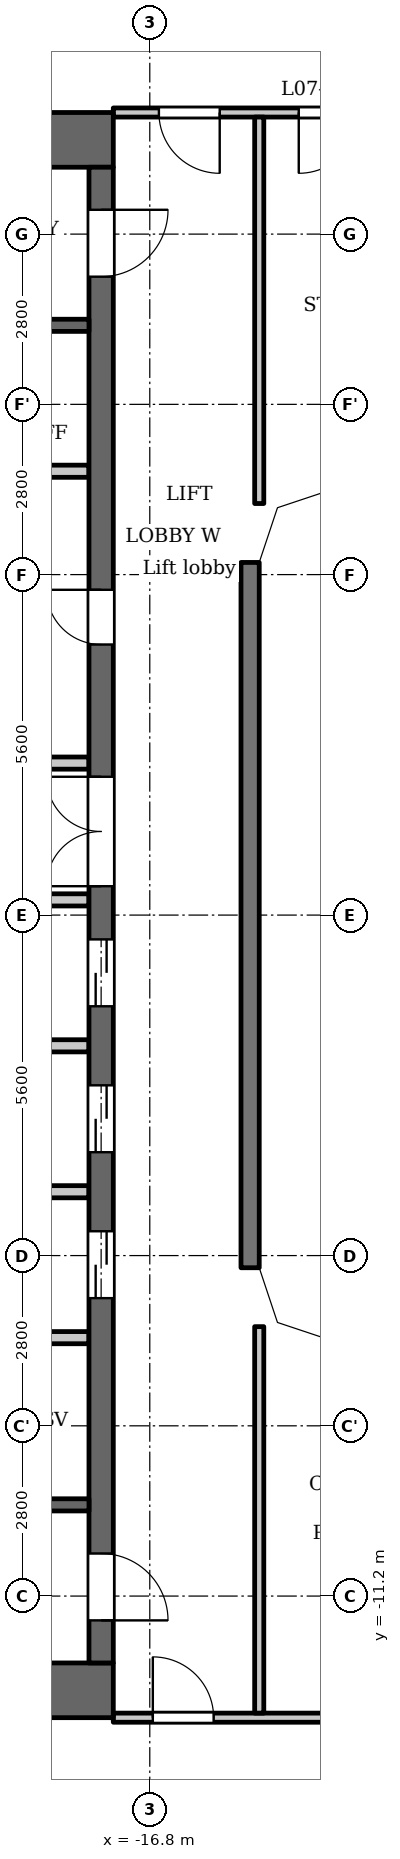
"""IFC4 building model, lengths in metres.
Left out: names, types, materials, properties, quantities, classifications, styles, units other than length and angle.
Written with IfcOpenShell. Run it as: python <this file> out.ifc"""

import sys

from ifc_helpers import new_model, si_unit, direction, frame, frame_2d, origin, place, context, subcontext, project, spatial, polyline, rectangle, outline, extrude, element, fill, save


model = new_model("IFC4")
c1 = context("Model", 3, precision=1e-05, world=origin(), true_north=direction((0.0, 1.0)))
c2 = subcontext(c1, "Body", "Model", "MODEL_VIEW")
j1 = project(units=[si_unit("LENGTHUNIT", "METRE"), si_unit("PLANEANGLEUNIT", "RADIAN")], contexts=[c1])
p1 = place(None, origin())
s1 = spatial("IfcSite", under=j1, at=p1, CompositionType="ELEMENT")
p2 = place(p1, origin())
s2 = spatial("IfcBuilding", under=s1, at=p2, CompositionType="ELEMENT")
p3 = place(p2, frame((0.0, 0.0, 34.0)))
s3 = spatial("IfcBuildingStorey", under=s2, at=p3, CompositionType="ELEMENT", Elevation=34.0)
p4 = place(p3, frame((-15.15, -5.8, 0.0), z_axis=(0.0, 0.0, 1.0), x_axis=(0.0, 1.0, 0.0)))
e1 = element("IfcWall", 1, at=p4, inside=s3, PredefinedType="SOLIDWALL", context=c2, shape_type="SweptSolid", body=[
    extrude(rectangle(XDim=11.6, YDim=0.3, at=frame_2d((5.8, 0.0))), origin(), (0.0, 0.0, 1.0), 3.2),
])
for number, where, z_axis, x_axis in (
    (2, (-17.4, 12.75, 0.0), (0.0, 0.0, 1.0), (-1.0, 0.0, 0.0)),
    (3, (-17.4, -12.75, 0.0), (0.0, 0.0, 1.0), (-1.0, 0.0, 0.0)),
):
    element("IfcWall", number, at=place(p3, frame(where, z_axis=z_axis, x_axis=x_axis)), inside=s3, PredefinedType="SHEAR", context=c2, shape_type="SweptSolid", body=[
        extrude(rectangle(XDim=10.4, YDim=0.9, at=frame_2d((5.2, 0.0))), origin(), (0.0, 0.0, 1.0), 3.2),
    ])
p5 = place(p3, frame((-17.6, -12.3, 0.0), z_axis=(0.0, 0.0, 1.0), x_axis=(0.0, 1.0, 0.0)))
e4 = element("IfcWall", 4, at=p5, inside=s3, PredefinedType="SHEAR", context=c2, shape_type="SweptSolid", body=[
    extrude(rectangle(XDim=24.6, YDim=0.4, at=frame_2d((12.3, 0.0))), origin(), (0.0, 0.0, 1.0), 3.2),
])
p6 = place(p5, frame((6.0, 0.0, 0.0)))
e5 = element("IfcOpeningElement", 5, at=p6, cuts=e4, PredefinedType="OPENING", context=c2, shape_type="SweptSolid", body=[
    extrude(rectangle(XDim=1.1, YDim=2.1, at=frame_2d((0.55, 1.05))), frame((0.0, 0.21, 0.0), z_axis=(0.0, -1.0, 0.0), x_axis=(1.0, 0.0, 0.0)), (0.0, 0.0, 1.0), 0.42),
])
p7 = place(p5, frame((8.4, 0.0, 0.0)))
e6 = element("IfcOpeningElement", 6, at=p7, cuts=e4, PredefinedType="OPENING", context=c2, shape_type="SweptSolid", body=[
    extrude(rectangle(XDim=1.1, YDim=2.1, at=frame_2d((0.55, 1.05))), frame((0.0, 0.21, 0.0), z_axis=(0.0, -1.0, 0.0), x_axis=(1.0, 0.0, 0.0)), (0.0, 0.0, 1.0), 0.42),
])
p8 = place(p5, frame((10.8, 0.0, 0.0)))
e7 = element("IfcOpeningElement", 7, at=p8, cuts=e4, PredefinedType="OPENING", context=c2, shape_type="SweptSolid", body=[
    extrude(rectangle(XDim=1.1, YDim=2.1, at=frame_2d((0.55, 1.05))), frame((0.0, 0.21, 0.0), z_axis=(0.0, -1.0, 0.0), x_axis=(1.0, 0.0, 0.0)), (0.0, 0.0, 1.0), 0.42),
])
p9 = place(p5, frame((16.75, 0.0, 0.0)))
e8 = element("IfcOpeningElement", 8, at=p9, cuts=e4, PredefinedType="OPENING", context=c2, shape_type="SweptSolid", body=[
    extrude(rectangle(XDim=0.9, YDim=2.1, at=frame_2d((0.45, 1.05))), frame((0.0, 0.21, 0.0), z_axis=(0.0, -1.0, 0.0), x_axis=(1.0, 0.0, 0.0)), (0.0, 0.0, 1.0), 0.42),
])
p10 = place(p5, frame((22.8, 0.0, 0.0)))
e9 = element("IfcOpeningElement", 9, at=p10, cuts=e4, PredefinedType="OPENING", context=c2, shape_type="SweptSolid", body=[
    extrude(rectangle(XDim=1.1, YDim=2.1, at=frame_2d((0.55, 1.05))), frame((0.0, 0.21, 0.0), z_axis=(0.0, -1.0, 0.0), x_axis=(1.0, 0.0, 0.0)), (0.0, 0.0, 1.0), 0.42),
])
p11 = place(p5, frame((0.7, 0.0, 0.0)))
e10 = element("IfcOpeningElement", 10, at=p11, cuts=e4, PredefinedType="OPENING", context=c2, shape_type="SweptSolid", body=[
    extrude(rectangle(XDim=1.1, YDim=2.1, at=frame_2d((0.55, 1.05))), frame((0.0, 0.21, 0.0), z_axis=(0.0, -1.0, 0.0), x_axis=(1.0, 0.0, 0.0)), (0.0, 0.0, 1.0), 0.42),
])
p12 = place(p5, frame((12.775, 0.0, 0.0)))
e11 = element("IfcOpeningElement", 11, at=p12, cuts=e4, PredefinedType="OPENING", context=c2, shape_type="SweptSolid", body=[
    extrude(rectangle(XDim=1.8, YDim=2.1, at=frame_2d((0.9, 1.05))), frame((0.0, 0.21, 0.0), z_axis=(0.0, -1.0, 0.0), x_axis=(1.0, 0.0, 0.0)), (0.0, 0.0, 1.0), 0.42),
])
p13 = place(p3, frame((-17.8, -9.7, 0.0), z_axis=(0.0, 0.0, 1.0), x_axis=(-1.0, 0.0, 0.0)))
e12 = element("IfcWall", 12, at=p13, inside=s3, PredefinedType="SHEAR", context=c2, shape_type="SweptSolid", body=[
    extrude(rectangle(XDim=8.3, YDim=0.2, at=frame_2d((4.15, 0.0))), origin(), (0.0, 0.0, 1.0), 3.2),
])
p14 = place(p13, frame((0.85, 0.0, 0.0)))
e13 = element("IfcOpeningElement", 13, at=p14, cuts=e12, PredefinedType="OPENING", context=c2, shape_type="SweptSolid", body=[
    extrude(rectangle(XDim=1.1, YDim=2.1, at=frame_2d((0.55, 1.05))), frame((0.0, 0.11, 0.0), z_axis=(0.0, -1.0, 0.0), x_axis=(1.0, 0.0, 0.0)), (0.0, 0.0, 1.0), 0.22),
])
p15 = place(p13, frame((3.75, 0.0, 0.0)))
e14 = element("IfcOpeningElement", 14, at=p15, cuts=e12, PredefinedType="OPENING", context=c2, shape_type="SweptSolid", body=[
    extrude(rectangle(XDim=1.1, YDim=2.1, at=frame_2d((0.55, 1.05))), frame((0.0, 0.11, 0.0), z_axis=(0.0, -1.0, 0.0), x_axis=(1.0, 0.0, 0.0)), (0.0, 0.0, 1.0), 0.22),
])
for number, where, z_axis, x_axis in (
    (15, (-17.8, -6.95, 0.0), (0.0, 0.0, 1.0), (-1.0, 0.0, 0.0)),
    (16, (-17.8, -4.55, 0.0), (0.0, 0.0, 1.0), (-1.0, 0.0, 0.0)),
    (17, (-17.8, -2.15, 0.0), (0.0, 0.0, 1.0), (-1.0, 0.0, 0.0)),
):
    element("IfcWall", number, at=place(p3, frame(where, z_axis=z_axis, x_axis=x_axis)), inside=s3, PredefinedType="PARTITIONING", context=c2, shape_type="SweptSolid", body=[
        extrude(rectangle(XDim=2.8, YDim=0.2, at=frame_2d((1.4, 0.0))), origin(), (0.0, 0.0, 1.0), 3.2),
    ])
for number, where, z_axis, x_axis in (
    (18, (-17.8, 0.25, 0.0), (0.0, 0.0, 1.0), (-1.0, 0.0, 0.0)),
    (19, (-17.8, 2.5, 0.0), (0.0, 0.0, 1.0), (-1.0, 0.0, 0.0)),
):
    element("IfcWall", number, at=place(p3, frame(where, z_axis=z_axis, x_axis=x_axis)), inside=s3, PredefinedType="PARTITIONING", context=c2, shape_type="SweptSolid", body=[
        extrude(rectangle(XDim=3.0, YDim=0.2, at=frame_2d((1.5, 0.0))), origin(), (0.0, 0.0, 1.0), 3.2),
    ])
p16 = place(p3, frame((-17.8, 7.3, 0.0), z_axis=(0.0, 0.0, 1.0), x_axis=(-1.0, 0.0, 0.0)))
e20 = element("IfcWall", 20, at=p16, inside=s3, PredefinedType="PARTITIONING", context=c2, shape_type="SweptSolid", body=[
    extrude(rectangle(XDim=2.8, YDim=0.2, at=frame_2d((1.4, 0.0))), origin(), (0.0, 0.0, 1.0), 3.2),
])
p17 = place(p3, frame((-17.8, 9.7, 0.0), z_axis=(0.0, 0.0, 1.0), x_axis=(-1.0, 0.0, 0.0)))
e21 = element("IfcWall", 21, at=p17, inside=s3, PredefinedType="SHEAR", context=c2, shape_type="SweptSolid", body=[
    extrude(rectangle(XDim=8.3, YDim=0.2, at=frame_2d((4.15, 0.0))), origin(), (0.0, 0.0, 1.0), 3.2),
])
p18 = place(p17, frame((0.85, 0.0, 0.0)))
e22 = element("IfcOpeningElement", 22, at=p18, cuts=e21, PredefinedType="OPENING", context=c2, shape_type="SweptSolid", body=[
    extrude(rectangle(XDim=1.1, YDim=2.1, at=frame_2d((0.55, 1.05))), frame((0.0, 0.11, 0.0), z_axis=(0.0, -1.0, 0.0), x_axis=(1.0, 0.0, 0.0)), (0.0, 0.0, 1.0), 0.22),
])
p19 = place(p17, frame((3.75, 0.0, 0.0)))
e23 = element("IfcOpeningElement", 23, at=p19, cuts=e21, PredefinedType="OPENING", context=c2, shape_type="SweptSolid", body=[
    extrude(rectangle(XDim=1.1, YDim=2.1, at=frame_2d((0.55, 1.05))), frame((0.0, 0.11, 0.0), z_axis=(0.0, -1.0, 0.0), x_axis=(1.0, 0.0, 0.0)), (0.0, 0.0, 1.0), 0.22),
])
p20 = place(p3, frame((-17.4, -13.2, 0.0), z_axis=(0.0, 0.0, 1.0), x_axis=(1.0, 0.0, 0.0)))
e24 = element("IfcWall", 24, at=p20, inside=s3, PredefinedType="PARTITIONING", context=c2, shape_type="SweptSolid", body=[
    extrude(rectangle(XDim=34.8, YDim=0.15, at=frame_2d((17.4, 0.0))), origin(), (0.0, 0.0, 1.0), 3.2),
])
p21 = place(p20, frame((0.65, 0.0, 0.0)))
e25 = element("IfcOpeningElement", 25, at=p21, cuts=e24, PredefinedType="OPENING", context=c2, shape_type="SweptSolid", body=[
    extrude(rectangle(XDim=1.0, YDim=2.1, at=frame_2d((0.5, 1.05))), frame((0.0, 0.085, 0.0), z_axis=(0.0, -1.0, 0.0), x_axis=(1.0, 0.0, 0.0)), (0.0, 0.0, 1.0), 0.17),
])
p22 = place(p20, frame((33.05, 0.0, 0.0)))
e26 = element("IfcOpeningElement", 26, at=p22, cuts=e24, PredefinedType="OPENING", context=c2, shape_type="SweptSolid", body=[
    extrude(rectangle(XDim=1.0, YDim=2.1, at=frame_2d((0.5, 1.05))), frame((0.0, 0.085, 0.0), z_axis=(0.0, -1.0, 0.0), x_axis=(1.0, 0.0, 0.0)), (0.0, 0.0, 1.0), 0.17),
])
p23 = place(p20, frame((4.55, 0.0, 0.0)))
e27 = element("IfcOpeningElement", 27, at=p23, cuts=e24, PredefinedType="OPENING", context=c2, shape_type="SweptSolid", body=[
    extrude(rectangle(XDim=1.0, YDim=2.1, at=frame_2d((0.5, 1.05))), frame((0.0, 0.085, 0.0), z_axis=(0.0, -1.0, 0.0), x_axis=(1.0, 0.0, 0.0)), (0.0, 0.0, 1.0), 0.17),
])
p24 = place(p20, frame((6.9, 0.0, 0.0)))
e28 = element("IfcOpeningElement", 28, at=p24, cuts=e24, PredefinedType="OPENING", context=c2, shape_type="SweptSolid", body=[
    extrude(rectangle(XDim=1.0, YDim=2.1, at=frame_2d((0.5, 1.05))), frame((0.0, 0.085, 0.0), z_axis=(0.0, -1.0, 0.0), x_axis=(1.0, 0.0, 0.0)), (0.0, 0.0, 1.0), 0.17),
])
p25 = place(p20, frame((15.75, 0.0, 0.0)))
e29 = element("IfcOpeningElement", 29, at=p25, cuts=e24, PredefinedType="OPENING", context=c2, shape_type="SweptSolid", body=[
    extrude(rectangle(XDim=1.0, YDim=2.1, at=frame_2d((0.5, 1.05))), frame((0.0, 0.085, 0.0), z_axis=(0.0, -1.0, 0.0), x_axis=(1.0, 0.0, 0.0)), (0.0, 0.0, 1.0), 0.17),
])
p26 = place(p20, frame((18.1, 0.0, 0.0)))
e30 = element("IfcOpeningElement", 30, at=p26, cuts=e24, PredefinedType="OPENING", context=c2, shape_type="SweptSolid", body=[
    extrude(rectangle(XDim=1.0, YDim=2.1, at=frame_2d((0.5, 1.05))), frame((0.0, 0.085, 0.0), z_axis=(0.0, -1.0, 0.0), x_axis=(1.0, 0.0, 0.0)), (0.0, 0.0, 1.0), 0.17),
])
p27 = place(p20, frame((26.95, 0.0, 0.0)))
e31 = element("IfcOpeningElement", 31, at=p27, cuts=e24, PredefinedType="OPENING", context=c2, shape_type="SweptSolid", body=[
    extrude(rectangle(XDim=1.0, YDim=2.1, at=frame_2d((0.5, 1.05))), frame((0.0, 0.085, 0.0), z_axis=(0.0, -1.0, 0.0), x_axis=(1.0, 0.0, 0.0)), (0.0, 0.0, 1.0), 0.17),
])
p28 = place(p20, frame((29.25, 0.0, 0.0)))
e32 = element("IfcOpeningElement", 32, at=p28, cuts=e24, PredefinedType="OPENING", context=c2, shape_type="SweptSolid", body=[
    extrude(rectangle(XDim=1.0, YDim=2.1, at=frame_2d((0.5, 1.05))), frame((0.0, 0.085, 0.0), z_axis=(0.0, -1.0, 0.0), x_axis=(1.0, 0.0, 0.0)), (0.0, 0.0, 1.0), 0.17),
])
p29 = place(p3, frame((-17.4, 13.2, 0.0), z_axis=(0.0, 0.0, 1.0), x_axis=(1.0, 0.0, 0.0)))
e33 = element("IfcWall", 33, at=p29, inside=s3, PredefinedType="PARTITIONING", context=c2, shape_type="SweptSolid", body=[
    extrude(rectangle(XDim=34.8, YDim=0.15, at=frame_2d((17.4, 0.0))), origin(), (0.0, 0.0, 1.0), 3.2),
])
p30 = place(p29, frame((0.75, 0.0, 0.0)))
e34 = element("IfcOpeningElement", 34, at=p30, cuts=e33, PredefinedType="OPENING", context=c2, shape_type="SweptSolid", body=[
    extrude(rectangle(XDim=1.0, YDim=2.1, at=frame_2d((0.5, 1.05))), frame((0.0, 0.085, 0.0), z_axis=(0.0, -1.0, 0.0), x_axis=(1.0, 0.0, 0.0)), (0.0, 0.0, 1.0), 0.17),
])
p31 = place(p29, frame((33.15, 0.0, 0.0)))
e35 = element("IfcOpeningElement", 35, at=p31, cuts=e33, PredefinedType="OPENING", context=c2, shape_type="SweptSolid", body=[
    extrude(rectangle(XDim=1.0, YDim=2.1, at=frame_2d((0.5, 1.05))), frame((0.0, 0.085, 0.0), z_axis=(0.0, -1.0, 0.0), x_axis=(1.0, 0.0, 0.0)), (0.0, 0.0, 1.0), 0.17),
])
p32 = place(p29, frame((3.05, 0.0, 0.0)))
e36 = element("IfcOpeningElement", 36, at=p32, cuts=e33, PredefinedType="OPENING", context=c2, shape_type="SweptSolid", body=[
    extrude(rectangle(XDim=1.0, YDim=2.1, at=frame_2d((0.5, 1.05))), frame((0.0, 0.085, 0.0), z_axis=(0.0, -1.0, 0.0), x_axis=(1.0, 0.0, 0.0)), (0.0, 0.0, 1.0), 0.17),
])
p33 = place(p29, frame((10.1, 0.0, 0.0)))
e37 = element("IfcOpeningElement", 37, at=p33, cuts=e33, PredefinedType="OPENING", context=c2, shape_type="SweptSolid", body=[
    extrude(rectangle(XDim=1.0, YDim=2.1, at=frame_2d((0.5, 1.05))), frame((0.0, 0.085, 0.0), z_axis=(0.0, -1.0, 0.0), x_axis=(1.0, 0.0, 0.0)), (0.0, 0.0, 1.0), 0.17),
])
p34 = place(p29, frame((12.45, 0.0, 0.0)))
e38 = element("IfcOpeningElement", 38, at=p34, cuts=e33, PredefinedType="OPENING", context=c2, shape_type="SweptSolid", body=[
    extrude(rectangle(XDim=1.0, YDim=2.1, at=frame_2d((0.5, 1.05))), frame((0.0, 0.085, 0.0), z_axis=(0.0, -1.0, 0.0), x_axis=(1.0, 0.0, 0.0)), (0.0, 0.0, 1.0), 0.17),
])
p35 = place(p29, frame((21.3, 0.0, 0.0)))
e39 = element("IfcOpeningElement", 39, at=p35, cuts=e33, PredefinedType="OPENING", context=c2, shape_type="SweptSolid", body=[
    extrude(rectangle(XDim=1.0, YDim=2.1, at=frame_2d((0.5, 1.05))), frame((0.0, 0.085, 0.0), z_axis=(0.0, -1.0, 0.0), x_axis=(1.0, 0.0, 0.0)), (0.0, 0.0, 1.0), 0.17),
])
p36 = place(p29, frame((23.65, 0.0, 0.0)))
e40 = element("IfcOpeningElement", 40, at=p36, cuts=e33, PredefinedType="OPENING", context=c2, shape_type="SweptSolid", body=[
    extrude(rectangle(XDim=1.0, YDim=2.1, at=frame_2d((0.5, 1.05))), frame((0.0, 0.085, 0.0), z_axis=(0.0, -1.0, 0.0), x_axis=(1.0, 0.0, 0.0)), (0.0, 0.0, 1.0), 0.17),
])
p37 = place(p29, frame((30.75, 0.0, 0.0)))
e41 = element("IfcOpeningElement", 41, at=p37, cuts=e33, PredefinedType="OPENING", context=c2, shape_type="SweptSolid", body=[
    extrude(rectangle(XDim=1.0, YDim=2.1, at=frame_2d((0.5, 1.05))), frame((0.0, 0.085, 0.0), z_axis=(0.0, -1.0, 0.0), x_axis=(1.0, 0.0, 0.0)), (0.0, 0.0, 1.0), 0.17),
])
for number, where, z_axis, x_axis in (
    (42, (-15.0, -13.125, 0.0), (0.0, 0.0, 1.0), (0.0, 1.0, 0.0)),
    (43, (-15.0, 6.769, 0.0), (0.0, 0.0, 1.0), (0.0, 1.0, 0.0)),
):
    element("IfcWall", number, at=place(p3, frame(where, z_axis=z_axis, x_axis=x_axis)), inside=s3, PredefinedType="PARTITIONING", context=c2, shape_type="SweptSolid", body=[
        extrude(rectangle(XDim=6.356, YDim=0.15, at=frame_2d((3.178, 0.0))), origin(), (0.0, 0.0, 1.0), 3.2),
    ])
p38 = place(p3, origin())
e44 = element("IfcWall", 44, at=p38, inside=s3, PredefinedType="SOLIDWALL", context=c2, shape_type="SweptSolid", body=[
    extrude(outline(polyline([(-13.849, 7.3), (-14.937, 6.937), (-15.3, 5.849), (-15.3, 5.8), (-15.0, 5.8), (-14.7, 6.7), (-13.8, 7.0), (-13.8, 7.3), (-13.849, 7.3)])), origin(), (0.0, 0.0, 1.0), 3.2),
])
e45 = element("IfcWall", 45, at=p38, inside=s3, PredefinedType="SOLIDWALL", context=c2, shape_type="SweptSolid", body=[
    extrude(outline(polyline([(-14.937, -6.937), (-13.849, -7.3), (-13.8, -7.3), (-13.8, -7.0), (-14.7, -6.7), (-15.0, -5.8), (-15.3, -5.8), (-15.3, -5.849), (-14.937, -6.937)])), origin(), (0.0, 0.0, 1.0), 3.2),
])
p39 = place(p6, origin())
e46 = element("IfcDoor", 46, at=p39, inside=s3, OperationType="DOUBLE_DOOR_SLIDING", PredefinedType="DOOR", context=c2, shape_type="SweptSolid", body=[
    extrude(rectangle(XDim=1.1, YDim=2.1, at=frame_2d((0.55, 1.05))), frame((0.0, 0.025, 0.0), z_axis=(0.0, -1.0, 0.0), x_axis=(1.0, 0.0, 0.0)), (0.0, 0.0, 1.0), 0.05),
])
fill(e5, e46)
p40 = place(p7, origin())
e47 = element("IfcDoor", 47, at=p40, inside=s3, OperationType="DOUBLE_DOOR_SLIDING", PredefinedType="DOOR", context=c2, shape_type="SweptSolid", body=[
    extrude(rectangle(XDim=1.1, YDim=2.1, at=frame_2d((0.55, 1.05))), frame((0.0, 0.025, 0.0), z_axis=(0.0, -1.0, 0.0), x_axis=(1.0, 0.0, 0.0)), (0.0, 0.0, 1.0), 0.05),
])
fill(e6, e47)
p41 = place(p8, origin())
e48 = element("IfcDoor", 48, at=p41, inside=s3, OperationType="DOUBLE_DOOR_SLIDING", PredefinedType="DOOR", context=c2, shape_type="SweptSolid", body=[
    extrude(rectangle(XDim=1.1, YDim=2.1, at=frame_2d((0.55, 1.05))), frame((0.0, 0.025, 0.0), z_axis=(0.0, -1.0, 0.0), x_axis=(1.0, 0.0, 0.0)), (0.0, 0.0, 1.0), 0.05),
])
fill(e7, e48)
p42 = place(p9, origin())
e49 = element("IfcDoor", 49, at=p42, inside=s3, OperationType="SINGLE_SWING_LEFT", PredefinedType="DOOR", context=c2, shape_type="SweptSolid", body=[
    extrude(rectangle(XDim=0.9, YDim=2.1, at=frame_2d((0.45, 1.05))), frame((0.0, 0.025, 0.0), z_axis=(0.0, -1.0, 0.0), x_axis=(1.0, 0.0, 0.0)), (0.0, 0.0, 1.0), 0.05),
])
fill(e8, e49)
p43 = place(p10, origin())
e50 = element("IfcDoor", 50, at=p43, inside=s3, OperationType="SINGLE_SWING_RIGHT", PredefinedType="DOOR", context=c2, shape_type="SweptSolid", body=[
    extrude(rectangle(XDim=1.1, YDim=2.1, at=frame_2d((0.55, 1.05))), frame((0.0, 0.025, 0.0), z_axis=(0.0, -1.0, 0.0), x_axis=(1.0, 0.0, 0.0)), (0.0, 0.0, 1.0), 0.05),
])
fill(e9, e50)
p44 = place(p11, origin())
e51 = element("IfcDoor", 51, at=p44, inside=s3, OperationType="SINGLE_SWING_LEFT", PredefinedType="DOOR", context=c2, shape_type="SweptSolid", body=[
    extrude(rectangle(XDim=1.1, YDim=2.1, at=frame_2d((0.55, 1.05))), frame((0.0, 0.025, 0.0), z_axis=(0.0, -1.0, 0.0), x_axis=(1.0, 0.0, 0.0)), (0.0, 0.0, 1.0), 0.05),
])
fill(e10, e51)
p45 = place(p12, origin())
e52 = element("IfcDoor", 52, at=p45, inside=s3, OperationType="DOUBLE_DOOR_SINGLE_SWING", PredefinedType="DOOR", context=c2, shape_type="SweptSolid", body=[
    extrude(rectangle(XDim=1.8, YDim=2.1, at=frame_2d((0.9, 1.05))), frame((0.0, 0.025, 0.0), z_axis=(0.0, -1.0, 0.0), x_axis=(1.0, 0.0, 0.0)), (0.0, 0.0, 1.0), 0.05),
])
fill(e11, e52)
p46 = place(p30, origin())
e53 = element("IfcDoor", 53, at=p46, inside=s3, OperationType="SINGLE_SWING_RIGHT", PredefinedType="DOOR", context=c2, shape_type="SweptSolid", body=[
    extrude(rectangle(XDim=1.0, YDim=2.1, at=frame_2d((0.5, 1.05))), frame((0.0, 0.025, 0.0), z_axis=(0.0, -1.0, 0.0), x_axis=(1.0, 0.0, 0.0)), (0.0, 0.0, 1.0), 0.05),
])
fill(e34, e53)
p47 = place(p21, origin())
e54 = element("IfcDoor", 54, at=p47, inside=s3, OperationType="SINGLE_SWING_RIGHT", PredefinedType="DOOR", context=c2, shape_type="SweptSolid", body=[
    extrude(rectangle(XDim=1.0, YDim=2.1, at=frame_2d((0.5, 1.05))), frame((0.0, 0.025, 0.0), z_axis=(0.0, -1.0, 0.0), x_axis=(1.0, 0.0, 0.0)), (0.0, 0.0, 1.0), 0.05),
])
fill(e25, e54)
p48 = place(p32, origin())
e55 = element("IfcDoor", 55, at=p48, inside=s3, OperationType="SINGLE_SWING_LEFT", PredefinedType="DOOR", context=c2, shape_type="SweptSolid", body=[
    extrude(rectangle(XDim=1.0, YDim=2.1, at=frame_2d((0.5, 1.05))), frame((0.0, 0.025, 0.0), z_axis=(0.0, -1.0, 0.0), x_axis=(1.0, 0.0, 0.0)), (0.0, 0.0, 1.0), 0.05),
])
fill(e36, e55)
save(model, sys.argv[1])
